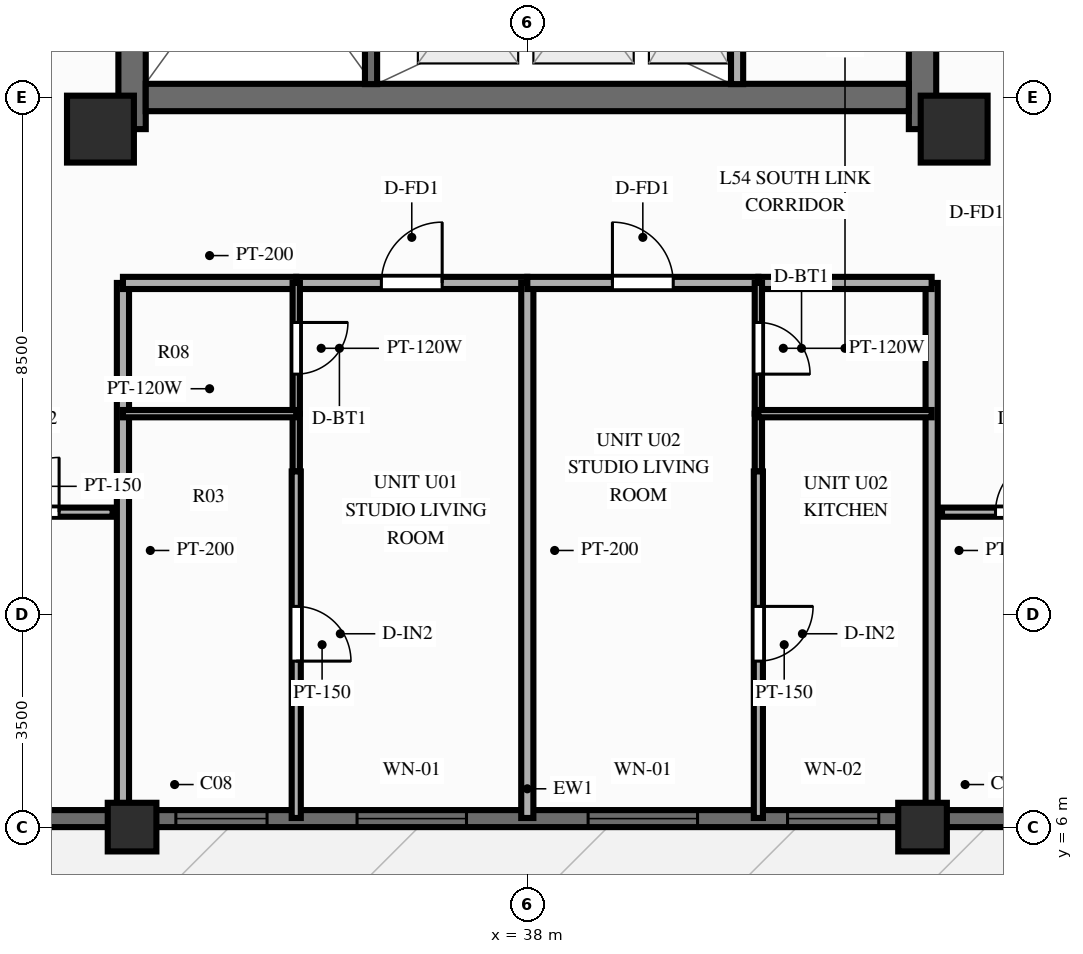
"""IFC4 building model, lengths in metres.
Left out: names, types, materials, properties, quantities, classifications, styles, units other than length and angle.
Written with IfcOpenShell. Run it as: python <this file> out.ifc"""

import sys

from ifc_helpers import new_model, si_unit, direction, frame, frame_2d, origin, origin_2d, place, context, subcontext, project, spatial, rectangle, extrude, source, transform, mapped, element, fill, save


model = new_model("IFC4")
c1 = context("Model", 3, precision=1e-05, world=origin(), true_north=direction((0.0, 1.0)))
c2 = subcontext(c1, "Body", "Model", "MODEL_VIEW")
j1 = project(units=[si_unit("LENGTHUNIT", "METRE"), si_unit("PLANEANGLEUNIT", "RADIAN")], contexts=[c1])
p1 = place(None, origin())
s1 = spatial("IfcSite", under=j1, at=p1, CompositionType="ELEMENT")
p2 = place(p1, origin())
s2 = spatial("IfcBuilding", under=s1, at=p2, CompositionType="ELEMENT")
p3 = place(p2, frame((0.0, 0.0, 172.9)))
s3 = spatial("IfcBuildingStorey", under=s2, at=p3, CompositionType="ELEMENT", Elevation=172.9)
p4 = place(p3, frame((31.5, 17.48, 0.0), z_axis=(0.0, 0.0, 1.0), x_axis=(0.0, 1.0, 0.0)))
e1 = element("IfcWall", 1, at=p4, inside=s3, PredefinedType="SHEAR", context=c2, shape_type="SweptSolid", body=[
    extrude(rectangle(XDim=19.04, YDim=0.45, at=frame_2d((9.52, 0.0))), origin(), (0.0, 0.0, 1.0), 3.9),
])
p5 = place(p4, frame((6.32, 0.0, 0.0)))
e2 = element("IfcOpeningElement", 2, at=p5, cuts=e1, PredefinedType="OPENING", context=c2, shape_type="SweptSolid", body=[
    extrude(rectangle(XDim=1.1, YDim=2.15, at=frame_2d((0.55, 1.075))), frame((0.0, 0.237, 0.0), z_axis=(0.0, -1.0, 0.0), x_axis=(1.0, 0.0, 0.0)), (0.0, 0.0, 1.0), 0.474),
])
p6 = place(p3, frame((44.5, 17.48, 0.0), z_axis=(0.0, 0.0, 1.0), x_axis=(0.0, 1.0, 0.0)))
e3 = element("IfcWall", 3, at=p6, inside=s3, PredefinedType="SHEAR", context=c2, shape_type="SweptSolid", body=[
    extrude(rectangle(XDim=19.04, YDim=0.45, at=frame_2d((9.52, 0.0))), origin(), (0.0, 0.0, 1.0), 3.9),
])
p7 = place(p6, frame((12.67, 0.0, 0.0), z_axis=(0.0, 0.0, 1.0), x_axis=(-1.0, 0.0, 0.0)))
e4 = element("IfcOpeningElement", 4, at=p7, cuts=e3, PredefinedType="OPENING", context=c2, shape_type="SweptSolid", body=[
    extrude(rectangle(XDim=1.1, YDim=2.15, at=frame_2d((0.55, 1.075))), frame((0.0, 0.237, 0.0), z_axis=(0.0, -1.0, 0.0), x_axis=(1.0, 0.0, 0.0)), (0.0, 0.0, 1.0), 0.474),
])
p8 = place(p3, frame((31.725, 18.0, 0.0), z_axis=(0.0, 0.0, 1.0), x_axis=(1.0, 0.0, 0.0)))
e5 = element("IfcWall", 5, at=p8, inside=s3, PredefinedType="SHEAR", context=c2, shape_type="SweptSolid", body=[
    extrude(rectangle(XDim=12.55, YDim=0.45, at=frame_2d((6.275, 0.0))), origin(), (0.0, 0.0, 1.0), 3.9),
])
m1 = source(origin(), c2, "Body", "SweptSolid", [
    extrude(rectangle(XDim=1.1, YDim=1.1, at=origin_2d()), origin(), (0.0, 0.0, 1.0), 3.9),
])
for number, where, z_axis, x_axis in (
    (6, (30.98, 17.48, 0.0), (0.0, 0.0, 1.0), (1.0, 0.0, 0.0)),
    (7, (45.02, 17.48, 0.0), (0.0, 0.0, 1.0), (1.0, 0.0, 0.0)),
):
    element("IfcColumn", number, at=place(p3, frame(where, z_axis=z_axis, x_axis=x_axis)), inside=s3, PredefinedType="COLUMN", context=c2, shape_type="MappedRepresentation", body=[
        mapped(m1, transform((0.0, 0.0, 0.0), scale=1.0)),
    ])
m2 = source(origin(), c2, "Body", "SweptSolid", [
    extrude(rectangle(XDim=0.8, YDim=0.8, at=origin_2d()), origin(), (0.0, 0.0, 1.0), 3.9),
])
for number, where, z_axis, x_axis in (
    (8, (31.5, 6.0, 0.0), (0.0, 0.0, 1.0), (1.0, 0.0, 0.0)),
    (9, (44.5, 6.0, 0.0), (0.0, 0.0, 1.0), (1.0, 0.0, 0.0)),
):
    element("IfcColumn", number, at=place(p3, frame(where, z_axis=z_axis, x_axis=x_axis)), inside=s3, PredefinedType="COLUMN", context=c2, shape_type="MappedRepresentation", body=[
        mapped(m2, transform((0.0, 0.0, 0.0), scale=1.0)),
    ])
p9 = place(p3, frame((22.75, 6.14, 0.0), z_axis=(0.0, 0.0, 1.0), x_axis=(1.0, 0.0, 0.0)))
e10 = element("IfcWall", 10, at=p9, inside=s3, PredefinedType="SOLIDWALL", context=c2, shape_type="SweptSolid", body=[
    extrude(rectangle(XDim=30.5, YDim=0.28, at=frame_2d((15.25, 0.0))), origin(), (0.0, 0.0, 1.0), 2.79),
])
p10 = place(p9, frame((4.925, 0.0, 0.0), z_axis=(0.0, 0.0, 1.0), x_axis=(-1.0, 0.0, 0.0)))
e11 = element("IfcOpeningElement", 11, at=p10, cuts=e10, PredefinedType="OPENING", context=c2, shape_type="SweptSolid", body=[
    extrude(rectangle(XDim=1.1, YDim=2.15, at=frame_2d((0.55, 1.075))), frame((0.0, 0.152, 0.0), z_axis=(0.0, -1.0, 0.0), x_axis=(1.0, 0.0, 0.0)), (0.0, 0.0, 1.0), 0.304),
])
p11 = place(p9, frame((9.47, 0.0, 0.85)))
e12 = element("IfcOpeningElement", 12, at=p11, cuts=e10, PredefinedType="OPENING", context=c2, shape_type="SweptSolid", body=[
    extrude(rectangle(XDim=1.5, YDim=1.65, at=frame_2d((0.75, 0.825))), frame((0.0, 0.152, 0.0), z_axis=(0.0, -1.0, 0.0), x_axis=(1.0, 0.0, 0.0)), (0.0, 0.0, 1.0), 0.304),
])
p12 = place(p9, frame((12.45, 0.0, 0.85)))
e13 = element("IfcOpeningElement", 13, at=p12, cuts=e10, PredefinedType="OPENING", context=c2, shape_type="SweptSolid", body=[
    extrude(rectangle(XDim=1.8, YDim=1.65, at=frame_2d((0.9, 0.825))), frame((0.0, 0.152, 0.0), z_axis=(0.0, -1.0, 0.0), x_axis=(1.0, 0.0, 0.0)), (0.0, 0.0, 1.0), 0.304),
])
p13 = place(p9, frame((16.25, 0.0, 0.85)))
e14 = element("IfcOpeningElement", 14, at=p13, cuts=e10, PredefinedType="OPENING", context=c2, shape_type="SweptSolid", body=[
    extrude(rectangle(XDim=1.8, YDim=1.65, at=frame_2d((0.9, 0.825))), frame((0.0, 0.152, 0.0), z_axis=(0.0, -1.0, 0.0), x_axis=(1.0, 0.0, 0.0)), (0.0, 0.0, 1.0), 0.304),
])
p14 = place(p9, frame((19.53, 0.0, 0.85)))
e15 = element("IfcOpeningElement", 15, at=p14, cuts=e10, PredefinedType="OPENING", context=c2, shape_type="SweptSolid", body=[
    extrude(rectangle(XDim=1.5, YDim=1.65, at=frame_2d((0.75, 0.825))), frame((0.0, 0.152, 0.0), z_axis=(0.0, -1.0, 0.0), x_axis=(1.0, 0.0, 0.0)), (0.0, 0.0, 1.0), 0.304),
])
p15 = place(p9, frame((25.225, 0.0, 0.85)))
e16 = element("IfcOpeningElement", 16, at=p15, cuts=e10, PredefinedType="OPENING", context=c2, shape_type="SweptSolid", body=[
    extrude(rectangle(XDim=1.8, YDim=1.65, at=frame_2d((0.9, 0.825))), frame((0.0, 0.152, 0.0), z_axis=(0.0, -1.0, 0.0), x_axis=(1.0, 0.0, 0.0)), (0.0, 0.0, 1.0), 0.304),
])
p16 = place(p3, frame((41.45, 18.22, 0.0), z_axis=(0.0, 0.0, 1.0), x_axis=(0.0, 1.0, 0.0)))
e17 = element("IfcWall", 17, at=p16, inside=s3, PredefinedType="PARTITIONING", context=c2, shape_type="SweptSolid", body=[
    extrude(rectangle(XDim=2.96, YDim=0.2, at=frame_2d((1.48, 0.0))), origin(), (0.0, 0.0, 1.0), 3.69),
])
p17 = place(p3, frame((35.43, 18.22, 0.0), z_axis=(0.0, 0.0, 1.0), x_axis=(0.0, 1.0, 0.0)))
e18 = element("IfcWall", 18, at=p17, inside=s3, PredefinedType="SOLIDWALL", context=c2, shape_type="SweptSolid", body=[
    extrude(rectangle(XDim=7.22, YDim=0.2, at=frame_2d((3.61, 0.0))), origin(), (0.0, 0.0, 1.0), 3.69),
])
p18 = place(p17, frame((6.68, 0.0, 0.0), z_axis=(0.0, 0.0, 1.0), x_axis=(-1.0, 0.0, 0.0)))
e19 = element("IfcOpeningElement", 19, at=p18, cuts=e18, PredefinedType="OPENING", context=c2, shape_type="SweptSolid", body=[
    extrude(rectangle(XDim=1.1, YDim=2.15, at=frame_2d((0.55, 1.075))), frame((0.0, 0.112, 0.0), z_axis=(0.0, -1.0, 0.0), x_axis=(1.0, 0.0, 0.0)), (0.0, 0.0, 1.0), 0.224),
])
p19 = place(p3, frame((28.85, 11.18, 0.0), z_axis=(0.0, 0.0, 1.0), x_axis=(1.0, 0.0, 0.0)))
e20 = element("IfcWall", 20, at=p19, inside=s3, PredefinedType="PARTITIONING", context=c2, shape_type="SweptSolid", body=[
    extrude(rectangle(XDim=2.33, YDim=0.15, at=frame_2d((1.165, 0.0))), origin(), (0.0, 0.0, 1.0), 3.69),
])
p20 = place(p19, frame((0.55, 0.0, 0.0)))
e21 = element("IfcOpeningElement", 21, at=p20, cuts=e20, PredefinedType="OPENING", context=c2, shape_type="SweptSolid", body=[
    extrude(rectangle(XDim=0.9, YDim=2.1, at=frame_2d((0.45, 1.05))), frame((0.0, 0.087, 0.0), z_axis=(0.0, -1.0, 0.0), x_axis=(1.0, 0.0, 0.0)), (0.0, 0.0, 1.0), 0.174),
])
p21 = place(p3, frame((44.82, 11.18, 0.0), z_axis=(0.0, 0.0, 1.0), x_axis=(1.0, 0.0, 0.0)))
e22 = element("IfcWall", 22, at=p21, inside=s3, PredefinedType="PARTITIONING", context=c2, shape_type="SweptSolid", body=[
    extrude(rectangle(XDim=2.33, YDim=0.15, at=frame_2d((1.165, 0.0))), origin(), (0.0, 0.0, 1.0), 3.69),
])
p22 = place(p21, frame((0.88, 0.0, 0.0)))
e23 = element("IfcOpeningElement", 23, at=p22, cuts=e22, PredefinedType="OPENING", context=c2, shape_type="SweptSolid", body=[
    extrude(rectangle(XDim=0.9, YDim=2.1, at=frame_2d((0.45, 1.05))), frame((0.0, 0.087, 0.0), z_axis=(0.0, -1.0, 0.0), x_axis=(1.0, 0.0, 0.0)), (0.0, 0.0, 1.0), 0.174),
])
for number, where, z_axis, x_axis in (
    (24, (31.35, 14.95, 0.0), (0.0, 0.0, 1.0), (0.0, -1.0, 0.0)),
    (25, (44.65, 14.95, 0.0), (0.0, 0.0, 1.0), (0.0, -1.0, 0.0)),
):
    element("IfcWall", number, at=place(p3, frame(where, z_axis=z_axis, x_axis=x_axis)), inside=s3, PredefinedType="PARTITIONING", context=c2, shape_type="SweptSolid", body=[
        extrude(rectangle(XDim=8.8, YDim=0.2, at=frame_2d((4.4, 0.0))), origin(), (0.0, 0.0, 1.0), 2.79),
    ])
p23 = place(p3, frame((31.35, 14.95, 0.0), z_axis=(0.0, 0.0, 1.0), x_axis=(1.0, 0.0, 0.0)))
e26 = element("IfcWall", 26, at=p23, inside=s3, PredefinedType="PARTITIONING", context=c2, shape_type="SweptSolid", body=[
    extrude(rectangle(XDim=2.85, YDim=0.2, at=frame_2d((1.425, 0.0))), origin(), (0.0, 0.0, 1.0), 3.69),
])
p24 = place(p3, frame((34.2, 14.95, 0.0), z_axis=(0.0, 0.0, 1.0), x_axis=(1.0, 0.0, 0.0)))
e27 = element("IfcWall", 27, at=p24, inside=s3, PredefinedType="PARTITIONING", context=c2, shape_type="SweptSolid", body=[
    extrude(rectangle(XDim=3.8, YDim=0.2, at=frame_2d((1.9, 0.0))), origin(), (0.0, 0.0, 1.0), 3.69),
])
p25 = place(p24, frame((1.4, 0.0, 0.0)))
e28 = element("IfcOpeningElement", 28, at=p25, cuts=e27, PredefinedType="OPENING", context=c2, shape_type="SweptSolid", body=[
    extrude(rectangle(XDim=1.0, YDim=2.15, at=frame_2d((0.5, 1.075))), frame((0.0, 0.112, 0.0), z_axis=(0.0, -1.0, 0.0), x_axis=(1.0, 0.0, 0.0)), (0.0, 0.0, 1.0), 0.224),
])
p26 = place(p3, frame((34.2, 14.95, 0.0), z_axis=(0.0, 0.0, 1.0), x_axis=(0.0, -1.0, 0.0)))
e29 = element("IfcWall", 29, at=p26, inside=s3, PredefinedType="PARTITIONING", context=c2, shape_type="SweptSolid", body=[
    extrude(rectangle(XDim=2.15, YDim=0.12, at=frame_2d((1.075, 0.0))), origin(), (0.0, 0.0, 1.0), 3.69),
])
p27 = place(p26, frame((0.65, 0.0, 0.0)))
e30 = element("IfcOpeningElement", 30, at=p27, cuts=e29, PredefinedType="OPENING", context=c2, shape_type="SweptSolid", body=[
    extrude(rectangle(XDim=0.85, YDim=2.05, at=frame_2d((0.425, 1.025))), frame((0.0, 0.072, 0.0), z_axis=(0.0, -1.0, 0.0), x_axis=(1.0, 0.0, 0.0)), (0.0, 0.0, 1.0), 0.144),
])
p28 = place(p3, frame((34.2, 12.8, 0.0), z_axis=(0.0, 0.0, 1.0), x_axis=(0.0, -1.0, 0.0)))
e31 = element("IfcWall", 31, at=p28, inside=s3, PredefinedType="PARTITIONING", context=c2, shape_type="SweptSolid", body=[
    extrude(rectangle(XDim=0.95, YDim=0.12, at=frame_2d((0.475, 0.0))), origin(), (0.0, 0.0, 1.0), 3.69),
])
p29 = place(p3, frame((31.35, 12.8, 0.0), z_axis=(0.0, 0.0, 1.0), x_axis=(1.0, 0.0, 0.0)))
e32 = element("IfcWall", 32, at=p29, inside=s3, PredefinedType="PARTITIONING", context=c2, shape_type="SweptSolid", body=[
    extrude(rectangle(XDim=2.85, YDim=0.12, at=frame_2d((1.425, 0.0))), origin(), (0.0, 0.0, 1.0), 3.69),
])
p30 = place(p3, frame((34.2, 11.85, 0.0), z_axis=(0.0, 0.0, 1.0), x_axis=(0.0, -1.0, 0.0)))
e33 = element("IfcWall", 33, at=p30, inside=s3, PredefinedType="PARTITIONING", context=c2, shape_type="SweptSolid", body=[
    extrude(rectangle(XDim=5.7, YDim=0.15, at=frame_2d((2.85, 0.0))), origin(), (0.0, 0.0, 1.0), 3.69),
])
p31 = place(p30, frame((2.22, 0.0, 0.0)))
e34 = element("IfcOpeningElement", 34, at=p31, cuts=e33, PredefinedType="OPENING", context=c2, shape_type="SweptSolid", body=[
    extrude(rectangle(XDim=0.9, YDim=2.1, at=frame_2d((0.45, 1.05))), frame((0.0, 0.087, 0.0), z_axis=(0.0, -1.0, 0.0), x_axis=(1.0, 0.0, 0.0)), (0.0, 0.0, 1.0), 0.174),
])
p32 = place(p3, frame((38.0, 14.95, 0.0), z_axis=(0.0, 0.0, 1.0), x_axis=(0.0, -1.0, 0.0)))
e35 = element("IfcWall", 35, at=p32, inside=s3, PredefinedType="PARTITIONING", context=c2, shape_type="SweptSolid", body=[
    extrude(rectangle(XDim=8.8, YDim=0.2, at=frame_2d((4.4, 0.0))), origin(), (0.0, 0.0, 1.0), 3.69),
])
p33 = place(p3, frame((38.0, 14.95, 0.0), z_axis=(0.0, 0.0, 1.0), x_axis=(1.0, 0.0, 0.0)))
e36 = element("IfcWall", 36, at=p33, inside=s3, PredefinedType="PARTITIONING", context=c2, shape_type="SweptSolid", body=[
    extrude(rectangle(XDim=3.8, YDim=0.2, at=frame_2d((1.9, 0.0))), origin(), (0.0, 0.0, 1.0), 3.69),
])
p34 = place(p33, frame((1.4, 0.0, 0.0)))
e37 = element("IfcOpeningElement", 37, at=p34, cuts=e36, PredefinedType="OPENING", context=c2, shape_type="SweptSolid", body=[
    extrude(rectangle(XDim=1.0, YDim=2.15, at=frame_2d((0.5, 1.075))), frame((0.0, 0.112, 0.0), z_axis=(0.0, -1.0, 0.0), x_axis=(1.0, 0.0, 0.0)), (0.0, 0.0, 1.0), 0.224),
])
p35 = place(p3, frame((41.8, 14.95, 0.0), z_axis=(0.0, 0.0, 1.0), x_axis=(1.0, 0.0, 0.0)))
e38 = element("IfcWall", 38, at=p35, inside=s3, PredefinedType="PARTITIONING", context=c2, shape_type="SweptSolid", body=[
    extrude(rectangle(XDim=2.85, YDim=0.2, at=frame_2d((1.425, 0.0))), origin(), (0.0, 0.0, 1.0), 3.69),
])
p36 = place(p3, frame((41.8, 14.95, 0.0), z_axis=(0.0, 0.0, 1.0), x_axis=(0.0, -1.0, 0.0)))
e39 = element("IfcWall", 39, at=p36, inside=s3, PredefinedType="PARTITIONING", context=c2, shape_type="SweptSolid", body=[
    extrude(rectangle(XDim=2.15, YDim=0.12, at=frame_2d((1.075, 0.0))), origin(), (0.0, 0.0, 1.0), 3.69),
])
p37 = place(p36, frame((0.65, 0.0, 0.0)))
e40 = element("IfcOpeningElement", 40, at=p37, cuts=e39, PredefinedType="OPENING", context=c2, shape_type="SweptSolid", body=[
    extrude(rectangle(XDim=0.85, YDim=2.05, at=frame_2d((0.425, 1.025))), frame((0.0, 0.072, 0.0), z_axis=(0.0, -1.0, 0.0), x_axis=(1.0, 0.0, 0.0)), (0.0, 0.0, 1.0), 0.144),
])
p38 = place(p3, frame((41.8, 12.8, 0.0), z_axis=(0.0, 0.0, 1.0), x_axis=(0.0, -1.0, 0.0)))
e41 = element("IfcWall", 41, at=p38, inside=s3, PredefinedType="PARTITIONING", context=c2, shape_type="SweptSolid", body=[
    extrude(rectangle(XDim=0.95, YDim=0.12, at=frame_2d((0.475, 0.0))), origin(), (0.0, 0.0, 1.0), 3.69),
])
p39 = place(p3, frame((41.8, 12.8, 0.0), z_axis=(0.0, 0.0, 1.0), x_axis=(1.0, 0.0, 0.0)))
e42 = element("IfcWall", 42, at=p39, inside=s3, PredefinedType="PARTITIONING", context=c2, shape_type="SweptSolid", body=[
    extrude(rectangle(XDim=2.85, YDim=0.12, at=frame_2d((1.425, 0.0))), origin(), (0.0, 0.0, 1.0), 3.69),
])
p40 = place(p3, frame((41.8, 11.85, 0.0), z_axis=(0.0, 0.0, 1.0), x_axis=(0.0, -1.0, 0.0)))
e43 = element("IfcWall", 43, at=p40, inside=s3, PredefinedType="PARTITIONING", context=c2, shape_type="SweptSolid", body=[
    extrude(rectangle(XDim=5.7, YDim=0.15, at=frame_2d((2.85, 0.0))), origin(), (0.0, 0.0, 1.0), 3.69),
])
p41 = place(p40, frame((2.22, 0.0, 0.0)))
e44 = element("IfcOpeningElement", 44, at=p41, cuts=e43, PredefinedType="OPENING", context=c2, shape_type="SweptSolid", body=[
    extrude(rectangle(XDim=0.9, YDim=2.1, at=frame_2d((0.45, 1.05))), frame((0.0, 0.087, 0.0), z_axis=(0.0, -1.0, 0.0), x_axis=(1.0, 0.0, 0.0)), (0.0, 0.0, 1.0), 0.174),
])
m3 = source(origin(), c2, "Body", "SweptSolid", [
    extrude(rectangle(XDim=1.5, YDim=1.65, at=frame_2d((0.75, 0.825))), frame((0.0, 0.03, 0.0), z_axis=(0.0, -1.0, 0.0), x_axis=(1.0, 0.0, 0.0)), (0.0, 0.0, 1.0), 0.06),
])
p42 = place(p11, origin())
e45 = element("IfcWindow", 45, at=p42, inside=s3, PartitioningType="SINGLE_PANEL", PredefinedType="WINDOW", context=c2, shape_type="MappedRepresentation", body=[
    mapped(m3, transform((0.0, 0.0, 0.0), scale=1.0)),
])
fill(e12, e45)
m4 = source(origin(), c2, "Body", "SweptSolid", [
    extrude(rectangle(XDim=1.8, YDim=1.65, at=frame_2d((0.9, 0.825))), frame((0.0, 0.03, 0.0), z_axis=(0.0, -1.0, 0.0), x_axis=(1.0, 0.0, 0.0)), (0.0, 0.0, 1.0), 0.06),
])
p43 = place(p12, origin())
e46 = element("IfcWindow", 46, at=p43, inside=s3, PartitioningType="SINGLE_PANEL", PredefinedType="WINDOW", context=c2, shape_type="MappedRepresentation", body=[
    mapped(m4, transform((0.0, 0.0, 0.0), scale=1.0)),
])
fill(e13, e46)
p44 = place(p13, origin())
e47 = element("IfcWindow", 47, at=p44, inside=s3, PartitioningType="SINGLE_PANEL", PredefinedType="WINDOW", context=c2, shape_type="MappedRepresentation", body=[
    mapped(m4, transform((0.0, 0.0, 0.0), scale=1.0)),
])
fill(e14, e47)
p45 = place(p14, origin())
e48 = element("IfcWindow", 48, at=p45, inside=s3, PartitioningType="SINGLE_PANEL", PredefinedType="WINDOW", context=c2, shape_type="MappedRepresentation", body=[
    mapped(m3, transform((0.0, 0.0, 0.0), scale=1.0)),
])
fill(e15, e48)
m5 = source(origin(), c2, "Body", "SweptSolid", [
    extrude(rectangle(XDim=0.9, YDim=2.1, at=frame_2d((0.45, 1.05))), frame((0.0, 0.025, 0.0), z_axis=(0.0, -1.0, 0.0), x_axis=(1.0, 0.0, 0.0)), (0.0, 0.0, 1.0), 0.05),
])
p46 = place(p20, origin())
e49 = element("IfcDoor", 49, at=p46, inside=s3, OperationType="SINGLE_SWING_RIGHT", PredefinedType="DOOR", context=c2, shape_type="MappedRepresentation", body=[
    mapped(m5, transform((0.0, 0.0, 0.0), scale=1.0)),
])
fill(e21, e49)
p47 = place(p22, origin())
e50 = element("IfcDoor", 50, at=p47, inside=s3, OperationType="SINGLE_SWING_RIGHT", PredefinedType="DOOR", context=c2, shape_type="MappedRepresentation", body=[
    mapped(m5, transform((0.0, 0.0, 0.0), scale=1.0)),
])
fill(e23, e50)
m6 = source(origin(), c2, "Body", "SweptSolid", [
    extrude(rectangle(XDim=1.0, YDim=2.15, at=frame_2d((0.5, 1.075))), frame((0.0, 0.025, 0.0), z_axis=(0.0, -1.0, 0.0), x_axis=(1.0, 0.0, 0.0)), (0.0, 0.0, 1.0), 0.05),
])
p48 = place(p25, origin())
e51 = element("IfcDoor", 51, at=p48, inside=s3, OperationType="SINGLE_SWING_RIGHT", PredefinedType="DOOR", context=c2, shape_type="MappedRepresentation", body=[
    mapped(m6, transform((0.0, 0.0, 0.0), scale=1.0)),
])
fill(e28, e51)
m7 = source(origin(), c2, "Body", "SweptSolid", [
    extrude(rectangle(XDim=0.85, YDim=2.05, at=frame_2d((0.425, 1.025))), frame((0.0, 0.025, 0.0), z_axis=(0.0, -1.0, 0.0), x_axis=(1.0, 0.0, 0.0)), (0.0, 0.0, 1.0), 0.05),
])
p49 = place(p27, origin())
e52 = element("IfcDoor", 52, at=p49, inside=s3, OperationType="SINGLE_SWING_LEFT", PredefinedType="DOOR", context=c2, shape_type="MappedRepresentation", body=[
    mapped(m7, transform((0.0, 0.0, 0.0), scale=1.0)),
])
fill(e30, e52)
p50 = place(p31, origin())
e53 = element("IfcDoor", 53, at=p50, inside=s3, OperationType="SINGLE_SWING_RIGHT", PredefinedType="DOOR", context=c2, shape_type="MappedRepresentation", body=[
    mapped(m5, transform((0.0, 0.0, 0.0), scale=1.0)),
])
fill(e34, e53)
p51 = place(p34, origin())
e54 = element("IfcDoor", 54, at=p51, inside=s3, OperationType="SINGLE_SWING_LEFT", PredefinedType="DOOR", context=c2, shape_type="MappedRepresentation", body=[
    mapped(m6, transform((0.0, 0.0, 0.0), scale=1.0)),
])
fill(e37, e54)
p52 = place(p37, origin())
e55 = element("IfcDoor", 55, at=p52, inside=s3, OperationType="SINGLE_SWING_RIGHT", PredefinedType="DOOR", context=c2, shape_type="MappedRepresentation", body=[
    mapped(m7, transform((0.0, 0.0, 0.0), scale=1.0)),
])
fill(e40, e55)
p53 = place(p41, origin())
e56 = element("IfcDoor", 56, at=p53, inside=s3, OperationType="SINGLE_SWING_LEFT", PredefinedType="DOOR", context=c2, shape_type="MappedRepresentation", body=[
    mapped(m5, transform((0.0, 0.0, 0.0), scale=1.0)),
])
fill(e44, e56)
save(model, sys.argv[1])
